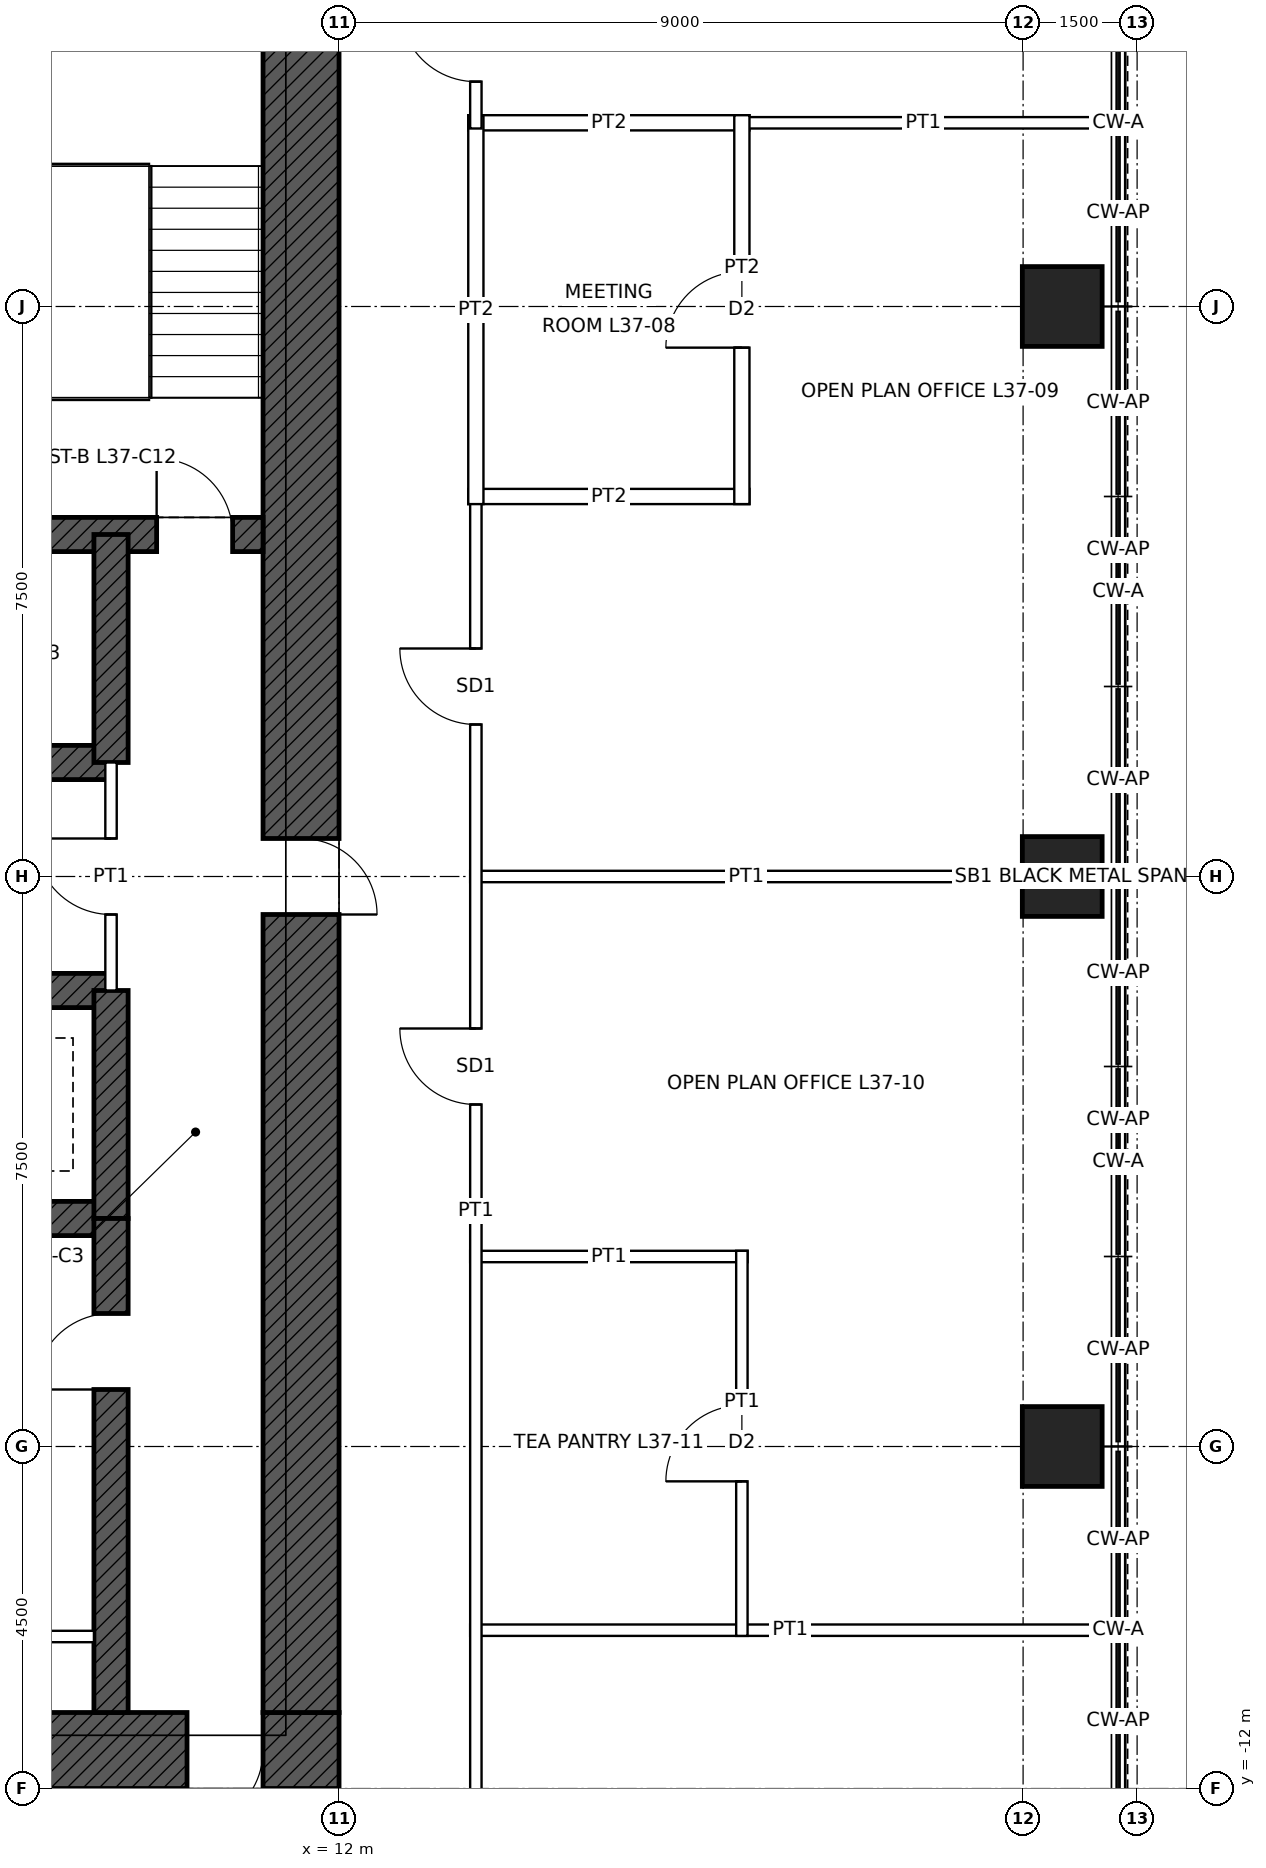
"""IFC4 building model, lengths in metres.
Left out: names, types, materials, properties, quantities, classifications, styles, units other than length and angle.
Written with IfcOpenShell. Run it as: python <this file> out.ifc"""

import sys

from ifc_helpers import new_model, si_unit, direction, frame, frame_2d, origin, origin_2d, place, context, subcontext, project, spatial, rectangle, hollow_rectangle, extrude, element, fill, save


model = new_model("IFC4")
c1 = context("Model", 3, precision=1e-05, world=origin(), true_north=direction((0.0, 1.0)))
c2 = subcontext(c1, "Body", "Model", "MODEL_VIEW")
j1 = project(units=[si_unit("LENGTHUNIT", "METRE"), si_unit("PLANEANGLEUNIT", "RADIAN")], contexts=[c1])
p1 = place(None, origin())
s1 = spatial("IfcSite", under=j1, at=p1, CompositionType="ELEMENT")
p2 = place(p1, origin())
s2 = spatial("IfcBuilding", under=s1, at=p2, CompositionType="ELEMENT")
p3 = place(p2, frame((0.0, 0.0, 181.9)))
s3 = spatial("IfcBuildingStorey", under=s2, at=p3, CompositionType="ELEMENT", Elevation=181.9)
p4 = place(p3, frame((21.515, 7.5, 0.0), z_axis=(0.0, 0.0, 1.0), x_axis=(1.0, 0.0, 0.0)))
e1 = element("IfcColumn", 1, at=p4, inside=s3, PredefinedType="COLUMN", context=c2, shape_type="SweptSolid", body=[
    extrude(hollow_rectangle(XDim=1.05, YDim=1.05, WallThickness=0.075, at=origin_2d()), origin(), (0.0, 0.0, 1.0), 4.0),
])
p5 = place(p3, frame((21.515, 0.0, 0.0), z_axis=(0.0, 0.0, 1.0), x_axis=(1.0, 0.0, 0.0)))
e2 = element("IfcColumn", 2, at=p5, inside=s3, PredefinedType="COLUMN", context=c2, shape_type="SweptSolid", body=[
    extrude(hollow_rectangle(XDim=1.05, YDim=1.05, WallThickness=0.07, at=origin_2d()), origin(), (0.0, 0.0, 1.0), 4.0),
])
p6 = place(p3, frame((21.515, -7.5, 0.0), z_axis=(0.0, 0.0, 1.0), x_axis=(1.0, 0.0, 0.0)))
e3 = element("IfcColumn", 3, at=p6, inside=s3, PredefinedType="COLUMN", context=c2, shape_type="SweptSolid", body=[
    extrude(hollow_rectangle(XDim=1.05, YDim=1.05, WallThickness=0.075, at=origin_2d()), origin(), (0.0, 0.0, 1.0), 4.0),
])
p7 = place(p3, frame((12.0, -11.5, 0.0), z_axis=(0.0, 0.0, 1.0), x_axis=(-1.0, 0.0, 0.0)))
e4 = element("IfcWall", 4, at=p7, inside=s3, PredefinedType="SHEAR", context=c2, shape_type="SweptSolid", body=[
    extrude(rectangle(XDim=24.0, YDim=1.0, at=frame_2d((12.0, 0.0))), origin(), (0.0, 0.0, 1.0), 4.0),
])
p8 = place(p7, frame((11.5, 0.0, 0.0)))
e5 = element("IfcOpeningElement", 5, at=p8, cuts=e4, PredefinedType="OPENING", context=c2, shape_type="SweptSolid", body=[
    extrude(rectangle(XDim=1.0, YDim=2.1, at=frame_2d((0.5, 1.05))), frame((0.0, 0.51, 0.0), z_axis=(0.0, -1.0, 0.0), x_axis=(1.0, 0.0, 0.0)), (0.0, 0.0, 1.0), 1.02),
])
p9 = place(p7, frame((1.0, 0.0, 0.0)))
e6 = element("IfcOpeningElement", 6, at=p9, cuts=e4, PredefinedType="OPENING", context=c2, shape_type="SweptSolid", body=[
    extrude(rectangle(XDim=1.0, YDim=2.4, at=frame_2d((0.5, 1.2))), frame((0.0, 0.51, 0.0), z_axis=(0.0, -1.0, 0.0), x_axis=(1.0, 0.0, 0.0)), (0.0, 0.0, 1.0), 1.02),
])
p10 = place(p3, frame((11.5, 11.0, 0.0), z_axis=(0.0, 0.0, 1.0), x_axis=(0.0, -1.0, 0.0)))
e7 = element("IfcWall", 7, at=p10, inside=s3, PredefinedType="SHEAR", context=c2, shape_type="SweptSolid", body=[
    extrude(rectangle(XDim=22.0, YDim=1.0, at=frame_2d((11.0, 0.0))), origin(), (0.0, 0.0, 1.0), 4.0),
])
p11 = place(p10, frame((10.5, 0.0, 0.0)))
e8 = element("IfcOpeningElement", 8, at=p11, cuts=e7, PredefinedType="OPENING", context=c2, shape_type="SweptSolid", body=[
    extrude(rectangle(XDim=1.0, YDim=2.4, at=frame_2d((0.5, 1.2))), frame((0.0, 0.51, 0.0), z_axis=(0.0, -1.0, 0.0), x_axis=(1.0, 0.0, 0.0)), (0.0, 0.0, 1.0), 1.02),
])
p12 = place(p3, frame((-11.0, 4.5, 0.0), z_axis=(0.0, 0.0, 1.0), x_axis=(1.0, 0.0, 0.0)))
e9 = element("IfcWall", 9, at=p12, inside=s3, PredefinedType="SHEAR", context=c2, shape_type="SweptSolid", body=[
    extrude(rectangle(XDim=22.0, YDim=0.45, at=frame_2d((11.0, 0.0))), origin(), (0.0, 0.0, 1.0), 4.0),
])
p13 = place(p12, frame((0.4, 0.0, 0.0)))
e10 = element("IfcOpeningElement", 10, at=p13, cuts=e9, PredefinedType="OPENING", context=c2, shape_type="SweptSolid", body=[
    extrude(rectangle(XDim=1.0, YDim=2.1, at=frame_2d((0.5, 1.05))), frame((0.0, 0.235, 0.0), z_axis=(0.0, -1.0, 0.0), x_axis=(1.0, 0.0, 0.0)), (0.0, 0.0, 1.0), 0.47),
])
p14 = place(p12, frame((20.6, 0.0, 0.0)))
e11 = element("IfcOpeningElement", 11, at=p14, cuts=e9, PredefinedType="OPENING", context=c2, shape_type="SweptSolid", body=[
    extrude(rectangle(XDim=1.0, YDim=2.1, at=frame_2d((0.5, 1.05))), frame((0.0, 0.235, 0.0), z_axis=(0.0, -1.0, 0.0), x_axis=(1.0, 0.0, 0.0)), (0.0, 0.0, 1.0), 0.47),
])
p15 = place(p3, frame((-9.0, 1.5, 0.0), z_axis=(0.0, 0.0, 1.0), x_axis=(1.0, 0.0, 0.0)))
e12 = element("IfcWall", 12, at=p15, inside=s3, PredefinedType="SHEAR", context=c2, shape_type="SweptSolid", body=[
    extrude(rectangle(XDim=18.0, YDim=0.45, at=frame_2d((9.0, 0.0))), origin(), (0.0, 0.0, 1.0), 4.0),
])
p16 = place(p15, frame((0.95, 0.0, 0.0)))
e13 = element("IfcOpeningElement", 13, at=p16, cuts=e12, PredefinedType="OPENING", context=c2, shape_type="SweptSolid", body=[
    extrude(rectangle(XDim=1.1, YDim=2.1, at=frame_2d((0.55, 1.05))), frame((0.0, 0.235, 0.0), z_axis=(0.0, -1.0, 0.0), x_axis=(1.0, 0.0, 0.0)), (0.0, 0.0, 1.0), 0.47),
])
p17 = place(p15, frame((3.95, 0.0, 0.0)))
e14 = element("IfcOpeningElement", 14, at=p17, cuts=e12, PredefinedType="OPENING", context=c2, shape_type="SweptSolid", body=[
    extrude(rectangle(XDim=1.1, YDim=2.1, at=frame_2d((0.55, 1.05))), frame((0.0, 0.235, 0.0), z_axis=(0.0, -1.0, 0.0), x_axis=(1.0, 0.0, 0.0)), (0.0, 0.0, 1.0), 0.47),
])
p18 = place(p15, frame((6.95, 0.0, 0.0)))
e15 = element("IfcOpeningElement", 15, at=p18, cuts=e12, PredefinedType="OPENING", context=c2, shape_type="SweptSolid", body=[
    extrude(rectangle(XDim=1.1, YDim=2.1, at=frame_2d((0.55, 1.05))), frame((0.0, 0.235, 0.0), z_axis=(0.0, -1.0, 0.0), x_axis=(1.0, 0.0, 0.0)), (0.0, 0.0, 1.0), 0.47),
])
p19 = place(p15, frame((9.95, 0.0, 0.0)))
e16 = element("IfcOpeningElement", 16, at=p19, cuts=e12, PredefinedType="OPENING", context=c2, shape_type="SweptSolid", body=[
    extrude(rectangle(XDim=1.1, YDim=2.1, at=frame_2d((0.55, 1.05))), frame((0.0, 0.235, 0.0), z_axis=(0.0, -1.0, 0.0), x_axis=(1.0, 0.0, 0.0)), (0.0, 0.0, 1.0), 0.47),
])
p20 = place(p15, frame((12.95, 0.0, 0.0)))
e17 = element("IfcOpeningElement", 17, at=p20, cuts=e12, PredefinedType="OPENING", context=c2, shape_type="SweptSolid", body=[
    extrude(rectangle(XDim=1.1, YDim=2.1, at=frame_2d((0.55, 1.05))), frame((0.0, 0.235, 0.0), z_axis=(0.0, -1.0, 0.0), x_axis=(1.0, 0.0, 0.0)), (0.0, 0.0, 1.0), 0.47),
])
p21 = place(p15, frame((15.95, 0.0, 0.0)))
e18 = element("IfcOpeningElement", 18, at=p21, cuts=e12, PredefinedType="OPENING", context=c2, shape_type="SweptSolid", body=[
    extrude(rectangle(XDim=1.1, YDim=2.1, at=frame_2d((0.55, 1.05))), frame((0.0, 0.235, 0.0), z_axis=(0.0, -1.0, 0.0), x_axis=(1.0, 0.0, 0.0)), (0.0, 0.0, 1.0), 0.47),
])
for number, where, z_axis, x_axis in (
    (19, (-9.0, -1.5, 0.0), (0.0, 0.0, 1.0), (1.0, 0.0, 0.0)),
    (20, (-9.0, -4.5, 0.0), (0.0, 0.0, 1.0), (1.0, 0.0, 0.0)),
):
    element("IfcWall", number, at=place(p3, frame(where, z_axis=z_axis, x_axis=x_axis)), inside=s3, PredefinedType="SHEAR", context=c2, shape_type="SweptSolid", body=[
        extrude(rectangle(XDim=18.0, YDim=0.45, at=frame_2d((9.0, 0.0))), origin(), (0.0, 0.0, 1.0), 4.0),
    ])
for number, where, z_axis, x_axis in (
    (21, (9.0, 1.5, 0.0), (0.0, 0.0, 1.0), (0.0, 1.0, 0.0)),
    (22, (9.0, -4.5, 0.0), (0.0, 0.0, 1.0), (0.0, 1.0, 0.0)),
):
    element("IfcWall", number, at=place(p3, frame(where, z_axis=z_axis, x_axis=x_axis)), inside=s3, PredefinedType="SHEAR", context=c2, shape_type="SweptSolid", body=[
        extrude(rectangle(XDim=3.0, YDim=0.45, at=frame_2d((1.5, 0.0))), origin(), (0.0, 0.0, 1.0), 4.0),
    ])
p22 = place(p3, frame((9.0, -11.0, 0.0), z_axis=(0.0, 0.0, 1.0), x_axis=(0.0, 1.0, 0.0)))
e23 = element("IfcWall", 23, at=p22, inside=s3, PredefinedType="SHEAR", context=c2, shape_type="SweptSolid", body=[
    extrude(rectangle(XDim=6.5, YDim=0.45, at=frame_2d((3.25, 0.0))), origin(), (0.0, 0.0, 1.0), 4.0),
])
p23 = place(p22, frame((4.25, 0.0, 0.0)))
e24 = element("IfcOpeningElement", 24, at=p23, cuts=e23, PredefinedType="OPENING", context=c2, shape_type="SweptSolid", body=[
    extrude(rectangle(XDim=1.0, YDim=2.1, at=frame_2d((0.5, 1.05))), frame((0.0, 0.235, 0.0), z_axis=(0.0, -1.0, 0.0), x_axis=(1.0, 0.0, 0.0)), (0.0, 0.0, 1.0), 0.47),
])
p24 = place(p3, frame((13.725, -9.917, 0.0), z_axis=(0.0, 0.0, 1.0), x_axis=(1.0, 0.0, 0.0)))
e25 = element("IfcWall", 25, at=p24, inside=s3, PredefinedType="PARTITIONING", context=c2, shape_type="SweptSolid", body=[
    extrude(rectangle(XDim=8.425, YDim=0.15, at=frame_2d((4.212, 0.0))), origin(), (0.0, 0.0, 1.0), 3.85),
])
p25 = place(p3, frame((13.725, -5.0, 0.0), z_axis=(0.0, 0.0, 1.0), x_axis=(1.0, 0.0, 0.0)))
e26 = element("IfcWall", 26, at=p25, inside=s3, PredefinedType="PARTITIONING", context=c2, shape_type="SweptSolid", body=[
    extrude(rectangle(XDim=3.65, YDim=0.15, at=frame_2d((1.825, 0.0))), origin(), (0.0, 0.0, 1.0), 3.85),
])
p26 = place(p3, frame((13.725, 0.0, 0.0), z_axis=(0.0, 0.0, 1.0), x_axis=(1.0, 0.0, 0.0)))
e27 = element("IfcWall", 27, at=p26, inside=s3, PredefinedType="PARTITIONING", context=c2, shape_type="SweptSolid", body=[
    extrude(rectangle(XDim=7.265, YDim=0.15, at=frame_2d((3.632, 0.0))), origin(), (0.0, 0.0, 1.0), 3.238),
])
for number, where, z_axis, x_axis in (
    (28, (13.7, 5.0, 0.0), (0.0, 0.0, 1.0), (1.0, 0.0, 0.0)),
    (29, (13.7, 9.917, 0.0), (0.0, 0.0, 1.0), (1.0, 0.0, 0.0)),
):
    element("IfcWall", number, at=place(p3, frame(where, z_axis=z_axis, x_axis=x_axis)), inside=s3, PredefinedType="PARTITIONING", context=c2, shape_type="SweptSolid", body=[
        extrude(rectangle(XDim=3.7, YDim=0.2, at=frame_2d((1.85, 0.0))), origin(), (0.0, 0.0, 1.0), 3.85),
    ])
p27 = place(p3, frame((17.225, 9.917, 0.0), z_axis=(0.0, 0.0, 1.0), x_axis=(1.0, 0.0, 0.0)))
e30 = element("IfcWall", 30, at=p27, inside=s3, PredefinedType="PARTITIONING", context=c2, shape_type="SweptSolid", body=[
    extrude(rectangle(XDim=4.925, YDim=0.15, at=frame_2d((2.462, 0.0))), origin(), (0.0, 0.0, 1.0), 3.85),
])
p28 = place(p3, frame((13.8, -13.875, 0.0), z_axis=(0.0, 0.0, 1.0), x_axis=(0.0, 1.0, 0.0)))
e31 = element("IfcWall", 31, at=p28, inside=s3, PredefinedType="PARTITIONING", context=c2, shape_type="SweptSolid", body=[
    extrude(rectangle(XDim=18.95, YDim=0.15, at=frame_2d((9.475, 0.0))), origin(), (0.0, 0.0, 1.0), 3.85),
])
p29 = place(p28, frame((15.875, 0.0, 0.0)))
e32 = element("IfcOpeningElement", 32, at=p29, cuts=e31, PredefinedType="OPENING", context=c2, shape_type="SweptSolid", body=[
    extrude(rectangle(XDim=1.0, YDim=2.4, at=frame_2d((0.5, 1.2))), frame((0.0, 0.085, 0.0), z_axis=(0.0, -1.0, 0.0), x_axis=(1.0, 0.0, 0.0)), (0.0, 0.0, 1.0), 0.17),
])
p30 = place(p28, frame((10.875, 0.0, 0.0)))
e33 = element("IfcOpeningElement", 33, at=p30, cuts=e31, PredefinedType="OPENING", context=c2, shape_type="SweptSolid", body=[
    extrude(rectangle(XDim=1.0, YDim=2.4, at=frame_2d((0.5, 1.2))), frame((0.0, 0.085, 0.0), z_axis=(0.0, -1.0, 0.0), x_axis=(1.0, 0.0, 0.0)), (0.0, 0.0, 1.0), 0.17),
])
p31 = place(p3, frame((13.8, 4.9, 0.0), z_axis=(0.0, 0.0, 1.0), x_axis=(0.0, 1.0, 0.0)))
e34 = element("IfcWall", 34, at=p31, inside=s3, PredefinedType="PARTITIONING", context=c2, shape_type="SweptSolid", body=[
    extrude(rectangle(XDim=5.117, YDim=0.2, at=frame_2d((2.559, 0.0))), origin(), (0.0, 0.0, 1.0), 3.85),
])
p32 = place(p3, frame((13.8, 9.842, 0.0), z_axis=(0.0, 0.0, 1.0), x_axis=(0.0, 1.0, 0.0)))
e35 = element("IfcWall", 35, at=p32, inside=s3, PredefinedType="PARTITIONING", context=c2, shape_type="SweptSolid", body=[
    extrude(rectangle(XDim=2.233, YDim=0.15, at=frame_2d((1.116, 0.0))), origin(), (0.0, 0.0, 1.0), 3.85),
])
p33 = place(p32, frame((0.616, 0.0, 0.0)))
e36 = element("IfcOpeningElement", 36, at=p33, cuts=e35, PredefinedType="OPENING", context=c2, shape_type="SweptSolid", body=[
    extrude(rectangle(XDim=1.0, YDim=2.4, at=frame_2d((0.5, 1.2))), frame((0.0, 0.085, 0.0), z_axis=(0.0, -1.0, 0.0), x_axis=(1.0, 0.0, 0.0)), (0.0, 0.0, 1.0), 0.17),
])
p34 = place(p3, frame((17.3, -9.992, 0.0), z_axis=(0.0, 0.0, 1.0), x_axis=(0.0, 1.0, 0.0)))
e37 = element("IfcWall", 37, at=p34, inside=s3, PredefinedType="PARTITIONING", context=c2, shape_type="SweptSolid", body=[
    extrude(rectangle(XDim=5.067, YDim=0.15, at=frame_2d((2.533, 0.0))), origin(), (0.0, 0.0, 1.0), 3.85),
])
p35 = place(p34, frame((2.033, 0.0, 0.0)))
e38 = element("IfcOpeningElement", 38, at=p35, cuts=e37, PredefinedType="OPENING", context=c2, shape_type="SweptSolid", body=[
    extrude(rectangle(XDim=1.0, YDim=2.1, at=frame_2d((0.5, 1.05))), frame((0.0, 0.085, 0.0), z_axis=(0.0, -1.0, 0.0), x_axis=(1.0, 0.0, 0.0)), (0.0, 0.0, 1.0), 0.17),
])
p36 = place(p3, frame((17.3, 4.9, 0.0), z_axis=(0.0, 0.0, 1.0), x_axis=(0.0, 1.0, 0.0)))
e39 = element("IfcWall", 39, at=p36, inside=s3, PredefinedType="PARTITIONING", context=c2, shape_type="SweptSolid", body=[
    extrude(rectangle(XDim=5.117, YDim=0.2, at=frame_2d((2.559, 0.0))), origin(), (0.0, 0.0, 1.0), 3.85),
])
p37 = place(p36, frame((2.059, 0.0, 0.0)))
e40 = element("IfcOpeningElement", 40, at=p37, cuts=e39, PredefinedType="OPENING", context=c2, shape_type="SweptSolid", body=[
    extrude(rectangle(XDim=1.0, YDim=2.1, at=frame_2d((0.5, 1.05))), frame((0.0, 0.11, 0.0), z_axis=(0.0, -1.0, 0.0), x_axis=(1.0, 0.0, 0.0)), (0.0, 0.0, 1.0), 0.22),
])
p38 = place(p3, frame((3.225, -10.0, 0.0), z_axis=(0.0, 0.0, 1.0), x_axis=(1.0, 0.0, 0.0)))
e41 = element("IfcWall", 41, at=p38, inside=s3, PredefinedType="PARTITIONING", context=c2, shape_type="SweptSolid", body=[
    extrude(rectangle(XDim=5.55, YDim=0.15, at=frame_2d((2.775, 0.0))), origin(), (0.0, 0.0, 1.0), 3.75),
])
p39 = place(p38, frame((2.275, 0.0, 0.0)))
e42 = element("IfcOpeningElement", 42, at=p39, cuts=e41, PredefinedType="OPENING", context=c2, shape_type="SweptSolid", body=[
    extrude(rectangle(XDim=1.0, YDim=2.1, at=frame_2d((0.5, 1.05))), frame((0.0, 0.085, 0.0), z_axis=(0.0, -1.0, 0.0), x_axis=(1.0, 0.0, 0.0)), (0.0, 0.0, 1.0), 0.17),
])
p40 = place(p3, frame((9.0, -1.5, 0.0), z_axis=(0.0, 0.0, 1.0), x_axis=(0.0, 1.0, 0.0)))
e43 = element("IfcWall", 43, at=p40, inside=s3, PredefinedType="PARTITIONING", context=c2, shape_type="SweptSolid", body=[
    extrude(rectangle(XDim=3.0, YDim=0.15, at=frame_2d((1.5, 0.0))), origin(), (0.0, 0.0, 1.0), 3.75),
])
p41 = place(p40, frame((1.0, 0.0, 0.0)))
e44 = element("IfcOpeningElement", 44, at=p41, cuts=e43, PredefinedType="OPENING", context=c2, shape_type="SweptSolid", body=[
    extrude(rectangle(XDim=1.0, YDim=2.4, at=frame_2d((0.5, 1.2))), frame((0.0, 0.085, 0.0), z_axis=(0.0, -1.0, 0.0), x_axis=(1.0, 0.0, 0.0)), (0.0, 0.0, 1.0), 0.17),
])
p42 = place(p14, origin())
e45 = element("IfcDoor", 45, at=p42, inside=s3, OperationType="SINGLE_SWING_LEFT", PredefinedType="DOOR", context=c2, shape_type="SweptSolid", body=[
    extrude(rectangle(XDim=1.0, YDim=2.1, at=frame_2d((0.5, 1.05))), frame((0.0, 0.025, 0.0), z_axis=(0.0, -1.0, 0.0), x_axis=(1.0, 0.0, 0.0)), (0.0, 0.0, 1.0), 0.05),
])
fill(e11, e45)
p43 = place(p11, origin())
e46 = element("IfcDoor", 46, at=p43, inside=s3, OperationType="SINGLE_SWING_RIGHT", PredefinedType="DOOR", context=c2, shape_type="SweptSolid", body=[
    extrude(rectangle(XDim=1.0, YDim=2.4, at=frame_2d((0.5, 1.2))), frame((0.0, 0.485, 0.0), z_axis=(0.0, -1.0, 0.0), x_axis=(1.0, 0.0, 0.0)), (0.0, 0.0, 1.0), 0.05),
])
fill(e8, e46)
p44 = place(p9, origin())
e47 = element("IfcDoor", 47, at=p44, inside=s3, OperationType="SINGLE_SWING_RIGHT", PredefinedType="DOOR", context=c2, shape_type="SweptSolid", body=[
    extrude(rectangle(XDim=1.0, YDim=2.4, at=frame_2d((0.5, 1.2))), frame((0.0, 0.485, 0.0), z_axis=(0.0, -1.0, 0.0), x_axis=(1.0, 0.0, 0.0)), (0.0, 0.0, 1.0), 0.05),
])
fill(e6, e47)
p45 = place(p23, origin())
e48 = element("IfcDoor", 48, at=p45, inside=s3, OperationType="SINGLE_SWING_LEFT", PredefinedType="DOOR", context=c2, shape_type="SweptSolid", body=[
    extrude(rectangle(XDim=1.0, YDim=2.1, at=frame_2d((0.5, 1.05))), frame((0.0, 0.025, 0.0), z_axis=(0.0, -1.0, 0.0), x_axis=(1.0, 0.0, 0.0)), (0.0, 0.0, 1.0), 0.05),
])
fill(e24, e48)
p46 = place(p41, origin())
e49 = element("IfcDoor", 49, at=p46, inside=s3, OperationType="SINGLE_SWING_RIGHT", PredefinedType="DOOR", context=c2, shape_type="SweptSolid", body=[
    extrude(rectangle(XDim=1.0, YDim=2.4, at=frame_2d((0.5, 1.2))), frame((0.0, 0.025, 0.0), z_axis=(0.0, -1.0, 0.0), x_axis=(1.0, 0.0, 0.0)), (0.0, 0.0, 1.0), 0.05),
])
fill(e44, e49)
p47 = place(p37, origin())
e50 = element("IfcDoor", 50, at=p47, inside=s3, OperationType="SINGLE_SWING_LEFT", PredefinedType="DOOR", context=c2, shape_type="SweptSolid", body=[
    extrude(rectangle(XDim=1.0, YDim=2.1, at=frame_2d((0.5, 1.05))), frame((0.0, 0.025, 0.0), z_axis=(0.0, -1.0, 0.0), x_axis=(1.0, 0.0, 0.0)), (0.0, 0.0, 1.0), 0.05),
])
fill(e40, e50)
p48 = place(p29, origin())
e51 = element("IfcDoor", 51, at=p48, inside=s3, OperationType="SINGLE_SWING_RIGHT", PredefinedType="DOOR", context=c2, shape_type="SweptSolid", body=[
    extrude(rectangle(XDim=1.0, YDim=2.4, at=frame_2d((0.5, 1.2))), frame((0.0, 0.025, 0.0), z_axis=(0.0, -1.0, 0.0), x_axis=(1.0, 0.0, 0.0)), (0.0, 0.0, 1.0), 0.05),
])
fill(e32, e51)
p49 = place(p30, origin())
e52 = element("IfcDoor", 52, at=p49, inside=s3, OperationType="SINGLE_SWING_RIGHT", PredefinedType="DOOR", context=c2, shape_type="SweptSolid", body=[
    extrude(rectangle(XDim=1.0, YDim=2.4, at=frame_2d((0.5, 1.2))), frame((0.0, 0.025, 0.0), z_axis=(0.0, -1.0, 0.0), x_axis=(1.0, 0.0, 0.0)), (0.0, 0.0, 1.0), 0.05),
])
fill(e33, e52)
p50 = place(p35, origin())
e53 = element("IfcDoor", 53, at=p50, inside=s3, OperationType="SINGLE_SWING_LEFT", PredefinedType="DOOR", context=c2, shape_type="SweptSolid", body=[
    extrude(rectangle(XDim=1.0, YDim=2.1, at=frame_2d((0.5, 1.05))), frame((0.0, 0.025, 0.0), z_axis=(0.0, -1.0, 0.0), x_axis=(1.0, 0.0, 0.0)), (0.0, 0.0, 1.0), 0.05),
])
fill(e38, e53)
p51 = place(p33, origin())
e54 = element("IfcDoor", 54, at=p51, inside=s3, OperationType="SINGLE_SWING_RIGHT", PredefinedType="DOOR", context=c2, shape_type="SweptSolid", body=[
    extrude(rectangle(XDim=1.0, YDim=2.4, at=frame_2d((0.5, 1.2))), frame((0.0, 0.025, 0.0), z_axis=(0.0, -1.0, 0.0), x_axis=(1.0, 0.0, 0.0)), (0.0, 0.0, 1.0), 0.05),
])
fill(e36, e54)
save(model, sys.argv[1])
